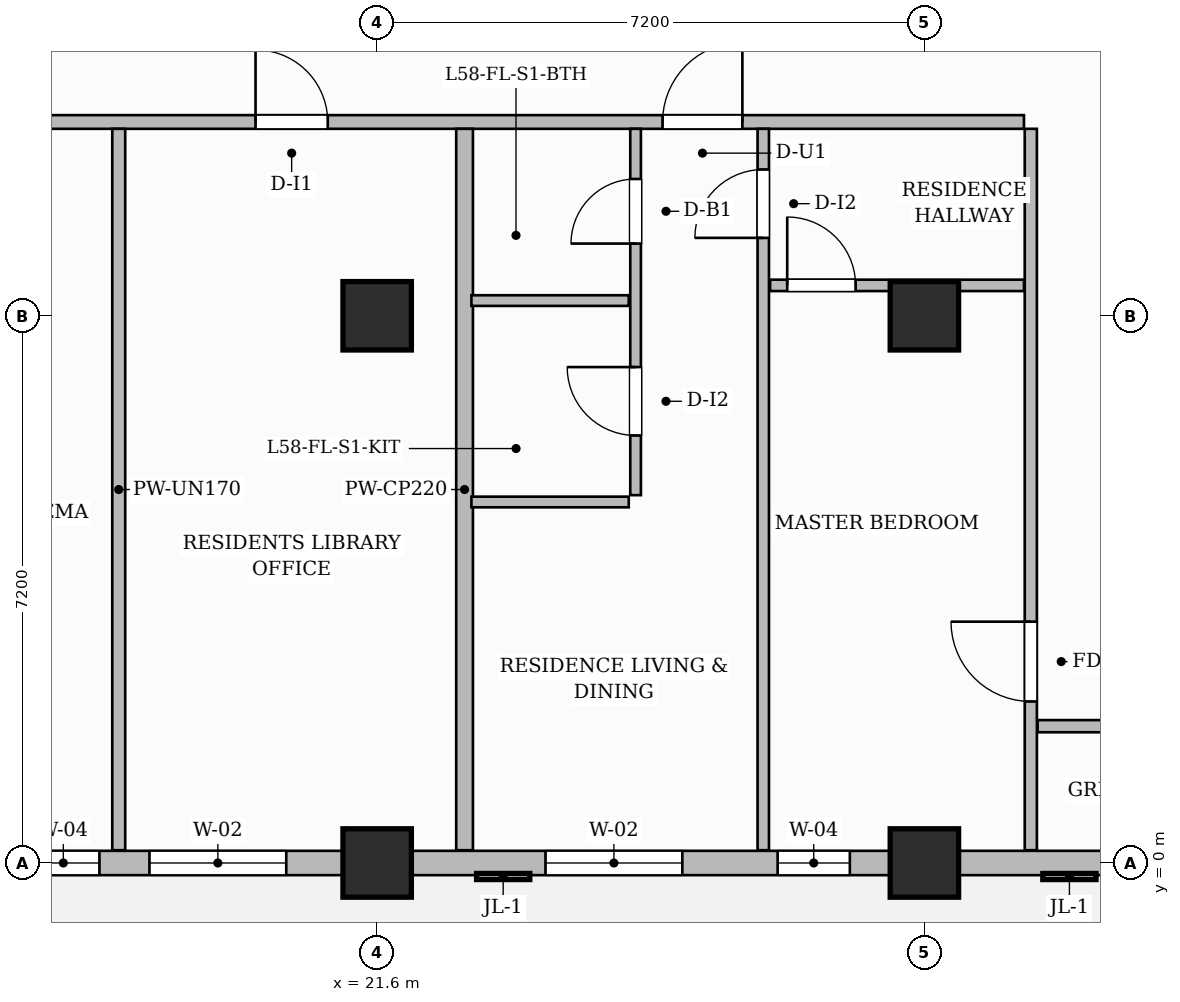
"""IFC4 building model, lengths in metres.
Left out: names, types, materials, properties, quantities, classifications, styles, units other than length and angle.
Written with IfcOpenShell. Run it as: python <this file> out.ifc"""

import sys

from ifc_helpers import new_model, si_unit, direction, frame, frame_2d, origin, origin_2d, place, context, subcontext, project, spatial, rectangle, extrude, source, transform, mapped, element, fill, save


model = new_model("IFC4")
c1 = context("Model", 3, precision=1e-05, world=origin(), true_north=direction((0.0, 1.0)))
c2 = subcontext(c1, "Body", "Model", "MODEL_VIEW")
j1 = project(units=[si_unit("LENGTHUNIT", "METRE"), si_unit("PLANEANGLEUNIT", "RADIAN")], contexts=[c1])
p1 = place(None, origin())
s1 = spatial("IfcSite", under=j1, at=p1, CompositionType="ELEMENT")
p2 = place(p1, origin())
s2 = spatial("IfcBuilding", under=s1, at=p2, CompositionType="ELEMENT")
p3 = place(p2, frame((0.0, 0.0, 232.7)))
s3 = spatial("IfcBuildingStorey", under=s2, at=p3, CompositionType="ELEMENT", Elevation=232.7)
m1 = source(origin(), c2, "Body", "SweptSolid", [
    extrude(rectangle(XDim=0.9, YDim=0.9, at=origin_2d()), origin(), (0.0, 0.0, 1.0), 3.85),
])
for number, where, z_axis, x_axis in (
    (1, (21.6, 0.0, 0.0), (0.0, 0.0, 1.0), (1.0, 0.0, 0.0)),
    (2, (21.6, 7.2, 0.0), (0.0, 0.0, 1.0), (1.0, 0.0, 0.0)),
    (3, (28.8, 0.0, 0.0), (0.0, 0.0, 1.0), (1.0, 0.0, 0.0)),
    (4, (28.8, 7.2, 0.0), (0.0, 0.0, 1.0), (1.0, 0.0, 0.0)),
):
    element("IfcColumn", number, at=place(p3, frame(where, z_axis=z_axis, x_axis=x_axis)), inside=s3, PredefinedType="COLUMN", context=c2, shape_type="MappedRepresentation", body=[
        mapped(m1, transform((0.0, 0.0, 0.0), scale=1.0)),
    ])
p4 = place(p3, frame((14.568, 9.75, 0.0), z_axis=(0.0, 0.0, 1.0), x_axis=(1.0, 0.0, 0.0)))
e5 = element("IfcWall", 5, at=p4, inside=s3, PredefinedType="PARTITIONING", context=c2, shape_type="SweptSolid", body=[
    extrude(rectangle(XDim=15.542, YDim=0.18, at=frame_2d((7.771, 0.0))), origin(), (0.0, 0.0, 1.0), 3.6),
])
p5 = place(p4, frame((1.032, 0.0, 0.0)))
e6 = element("IfcOpeningElement", 6, at=p5, cuts=e5, PredefinedType="OPENING", context=c2, shape_type="SweptSolid", body=[
    extrude(rectangle(XDim=1.4, YDim=2.35, at=frame_2d((0.7, 1.175))), frame((0.0, 0.1, 0.0), z_axis=(0.0, -1.0, 0.0), x_axis=(1.0, 0.0, 0.0)), (0.0, 0.0, 1.0), 0.2),
])
p6 = place(p4, frame((5.432, 0.0, 0.0)))
e7 = element("IfcOpeningElement", 7, at=p6, cuts=e5, PredefinedType="OPENING", context=c2, shape_type="SweptSolid", body=[
    extrude(rectangle(XDim=0.95, YDim=2.15, at=frame_2d((0.475, 1.075))), frame((0.0, 0.1, 0.0), z_axis=(0.0, -1.0, 0.0), x_axis=(1.0, 0.0, 0.0)), (0.0, 0.0, 1.0), 0.2),
])
p7 = place(p4, frame((10.787, 0.0, 0.0)))
e8 = element("IfcOpeningElement", 8, at=p7, cuts=e5, PredefinedType="OPENING", context=c2, shape_type="SweptSolid", body=[
    extrude(rectangle(XDim=1.05, YDim=2.25, at=frame_2d((0.525, 1.125))), frame((0.0, 0.1, 0.0), z_axis=(0.0, -1.0, 0.0), x_axis=(1.0, 0.0, 0.0)), (0.0, 0.0, 1.0), 0.2),
])
p8 = place(p3, frame((30.2, 0.168, 0.0), z_axis=(0.0, 0.0, 1.0), x_axis=(0.0, 1.0, 0.0)))
e9 = element("IfcWall", 9, at=p8, inside=s3, PredefinedType="PARTITIONING", context=c2, shape_type="SweptSolid", body=[
    extrude(rectangle(XDim=9.492, YDim=0.16, at=frame_2d((4.746, 0.0))), origin(), (0.0, 0.0, 1.0), 3.6),
])
p9 = place(p8, frame((1.957, 0.0, 0.0)))
e10 = element("IfcOpeningElement", 10, at=p9, cuts=e9, PredefinedType="OPENING", context=c2, shape_type="SweptSolid", body=[
    extrude(rectangle(XDim=1.05, YDim=2.15, at=frame_2d((0.525, 1.075))), frame((0.0, 0.09, 0.0), z_axis=(0.0, -1.0, 0.0), x_axis=(1.0, 0.0, 0.0)), (0.0, 0.0, 1.0), 0.18),
])
p10 = place(p3, frame((30.29, 1.8, 0.0), z_axis=(0.0, 0.0, 1.0), x_axis=(1.0, 0.0, 0.0)))
e11 = element("IfcWall", 11, at=p10, inside=s3, PredefinedType="PARTITIONING", context=c2, shape_type="SweptSolid", body=[
    extrude(rectangle(XDim=19.37, YDim=0.16, at=frame_2d((9.685, 0.0))), origin(), (0.0, 0.0, 1.0), 3.6),
])
p11 = place(p10, frame((5.074, 0.0, 0.0)))
e12 = element("IfcOpeningElement", 12, at=p11, cuts=e11, PredefinedType="OPENING", context=c2, shape_type="SweptSolid", body=[
    extrude(rectangle(XDim=0.9, YDim=2.15, at=frame_2d((0.45, 1.075))), frame((0.0, 0.09, 0.0), z_axis=(0.0, -1.0, 0.0), x_axis=(1.0, 0.0, 0.0)), (0.0, 0.0, 1.0), 0.18),
])
p12 = place(p10, frame((14.06, 0.0, 0.0)))
e13 = element("IfcOpeningElement", 13, at=p12, cuts=e11, PredefinedType="OPENING", context=c2, shape_type="SweptSolid", body=[
    extrude(rectangle(XDim=0.9, YDim=2.15, at=frame_2d((0.45, 1.075))), frame((0.0, 0.09, 0.0), z_axis=(0.0, -1.0, 0.0), x_axis=(1.0, 0.0, 0.0)), (0.0, 0.0, 1.0), 0.18),
])
p13 = place(p3, frame((18.2, 0.168, 0.0), z_axis=(0.0, 0.0, 1.0), x_axis=(0.0, 1.0, 0.0)))
e14 = element("IfcWall", 14, at=p13, inside=s3, PredefinedType="PARTITIONING", context=c2, shape_type="SweptSolid", body=[
    extrude(rectangle(XDim=9.492, YDim=0.17, at=frame_2d((4.746, 0.0))), origin(), (0.0, 0.0, 1.0), 3.315),
])
p14 = place(p3, frame((22.75, 0.168, 0.0), z_axis=(0.0, 0.0, 1.0), x_axis=(0.0, 1.0, 0.0)))
e15 = element("IfcWall", 15, at=p14, inside=s3, PredefinedType="PARTITIONING", context=c2, shape_type="SweptSolid", body=[
    extrude(rectangle(XDim=9.492, YDim=0.22, at=frame_2d((4.746, 0.0))), origin(), (0.0, 0.0, 1.0), 3.6),
])
p15 = place(p3, frame((25.0, 4.84, 0.0), z_axis=(0.0, 0.0, 1.0), x_axis=(0.0, 1.0, 0.0)))
e16 = element("IfcWall", 16, at=p15, inside=s3, PredefinedType="PARTITIONING", context=c2, shape_type="SweptSolid", body=[
    extrude(rectangle(XDim=4.82, YDim=0.14, at=frame_2d((2.41, 0.0))), origin(), (0.0, 0.0, 1.0), 3.315),
])
p16 = place(p15, frame((0.785, 0.0, 0.0)))
e17 = element("IfcOpeningElement", 17, at=p16, cuts=e16, PredefinedType="OPENING", context=c2, shape_type="SweptSolid", body=[
    extrude(rectangle(XDim=0.9, YDim=2.15, at=frame_2d((0.45, 1.075))), frame((0.0, 0.08, 0.0), z_axis=(0.0, -1.0, 0.0), x_axis=(1.0, 0.0, 0.0)), (0.0, 0.0, 1.0), 0.16),
])
p17 = place(p15, frame((3.31, 0.0, 0.0)))
e18 = element("IfcOpeningElement", 18, at=p17, cuts=e16, PredefinedType="OPENING", context=c2, shape_type="SweptSolid", body=[
    extrude(rectangle(XDim=0.85, YDim=2.1, at=frame_2d((0.425, 1.05))), frame((0.0, 0.08, 0.0), z_axis=(0.0, -1.0, 0.0), x_axis=(1.0, 0.0, 0.0)), (0.0, 0.0, 1.0), 0.16),
])
p18 = place(p3, frame((22.84, 7.4, 0.0), z_axis=(0.0, 0.0, 1.0), x_axis=(1.0, 0.0, 0.0)))
e19 = element("IfcWall", 19, at=p18, inside=s3, PredefinedType="PARTITIONING", context=c2, shape_type="SweptSolid", body=[
    extrude(rectangle(XDim=2.07, YDim=0.14, at=frame_2d((1.035, 0.0))), origin(), (0.0, 0.0, 1.0), 3.135),
])
p19 = place(p3, frame((22.84, 4.75, 0.0), z_axis=(0.0, 0.0, 1.0), x_axis=(1.0, 0.0, 0.0)))
e20 = element("IfcWall", 20, at=p19, inside=s3, PredefinedType="PARTITIONING", context=c2, shape_type="SweptSolid", body=[
    extrude(rectangle(XDim=2.07, YDim=0.14, at=frame_2d((1.035, 0.0))), origin(), (0.0, 0.0, 1.0), 3.6),
])
p20 = place(p3, frame((26.68, 0.168, 0.0), z_axis=(0.0, 0.0, 1.0), x_axis=(0.0, 1.0, 0.0)))
e21 = element("IfcWall", 21, at=p20, inside=s3, PredefinedType="PARTITIONING", context=c2, shape_type="SweptSolid", body=[
    extrude(rectangle(XDim=9.492, YDim=0.15, at=frame_2d((4.746, 0.0))), origin(), (0.0, 0.0, 1.0), 3.6),
])
p21 = place(p20, frame((8.057, 0.0, 0.0)))
e22 = element("IfcOpeningElement", 22, at=p21, cuts=e21, PredefinedType="OPENING", context=c2, shape_type="SweptSolid", body=[
    extrude(rectangle(XDim=0.9, YDim=2.15, at=frame_2d((0.45, 1.075))), frame((0.0, 0.085, 0.0), z_axis=(0.0, -1.0, 0.0), x_axis=(1.0, 0.0, 0.0)), (0.0, 0.0, 1.0), 0.17),
])
p22 = place(p3, frame((26.77, 7.6, 0.0), z_axis=(0.0, 0.0, 1.0), x_axis=(1.0, 0.0, 0.0)))
e23 = element("IfcWall", 23, at=p22, inside=s3, PredefinedType="PARTITIONING", context=c2, shape_type="SweptSolid", body=[
    extrude(rectangle(XDim=3.34, YDim=0.15, at=frame_2d((1.67, 0.0))), origin(), (0.0, 0.0, 1.0), 3.6),
])
p23 = place(p22, frame((0.225, 0.0, 0.0)))
e24 = element("IfcOpeningElement", 24, at=p23, cuts=e23, PredefinedType="OPENING", context=c2, shape_type="SweptSolid", body=[
    extrude(rectangle(XDim=0.9, YDim=2.15, at=frame_2d((0.45, 1.075))), frame((0.0, 0.085, 0.0), z_axis=(0.0, -1.0, 0.0), x_axis=(1.0, 0.0, 0.0)), (0.0, 0.0, 1.0), 0.17),
])
p24 = place(p3, frame((14.4, 0.0, 0.0), z_axis=(0.0, 0.0, 1.0), x_axis=(1.0, 0.0, 0.0)))
e25 = element("IfcWall", 25, at=p24, inside=s3, PredefinedType="SOLIDWALL", context=c2, shape_type="SweptSolid", body=[
    extrude(rectangle(XDim=35.4, YDim=0.32, at=frame_2d((17.7, 0.0))), origin(), (0.0, 0.0, 1.0), 3.135),
])
p25 = place(p24, frame((0.85, 0.0, 0.0)))
e26 = element("IfcOpeningElement", 26, at=p25, cuts=e25, PredefinedType="OPENING", context=c2, shape_type="SweptSolid", body=[
    extrude(rectangle(XDim=1.2, YDim=2.2, at=frame_2d((0.6, 1.1))), frame((0.0, 0.17, 0.0), z_axis=(0.0, -1.0, 0.0), x_axis=(1.0, 0.0, 0.0)), (0.0, 0.0, 1.0), 0.34),
])
p26 = place(p24, frame((2.596, 0.0, 0.8)))
e27 = element("IfcOpeningElement", 27, at=p26, cuts=e25, PredefinedType="OPENING", context=c2, shape_type="SweptSolid", body=[
    extrude(rectangle(XDim=0.95, YDim=1.75, at=frame_2d((0.475, 0.875))), frame((0.0, 0.17, 0.0), z_axis=(0.0, -1.0, 0.0), x_axis=(1.0, 0.0, 0.0)), (0.0, 0.0, 1.0), 0.34),
])
p27 = place(p24, frame((4.204, 0.0, 0.8)))
e28 = element("IfcOpeningElement", 28, at=p27, cuts=e25, PredefinedType="OPENING", context=c2, shape_type="SweptSolid", body=[
    extrude(rectangle(XDim=1.8, YDim=1.85, at=frame_2d((0.9, 0.925))), frame((0.0, 0.17, 0.0), z_axis=(0.0, -1.0, 0.0), x_axis=(1.0, 0.0, 0.0)), (0.0, 0.0, 1.0), 0.34),
])
p28 = place(p24, frame((9.415, 0.0, 0.8)))
e29 = element("IfcOpeningElement", 29, at=p28, cuts=e25, PredefinedType="OPENING", context=c2, shape_type="SweptSolid", body=[
    extrude(rectangle(XDim=1.8, YDim=1.85, at=frame_2d((0.9, 0.925))), frame((0.0, 0.17, 0.0), z_axis=(0.0, -1.0, 0.0), x_axis=(1.0, 0.0, 0.0)), (0.0, 0.0, 1.0), 0.34),
])
p29 = place(p24, frame((12.469, 0.0, 0.8)))
e30 = element("IfcOpeningElement", 30, at=p29, cuts=e25, PredefinedType="OPENING", context=c2, shape_type="SweptSolid", body=[
    extrude(rectangle(XDim=0.95, YDim=1.75, at=frame_2d((0.475, 0.875))), frame((0.0, 0.17, 0.0), z_axis=(0.0, -1.0, 0.0), x_axis=(1.0, 0.0, 0.0)), (0.0, 0.0, 1.0), 0.34),
])
p30 = place(p24, frame((16.804, 0.0, 0.8)))
e31 = element("IfcOpeningElement", 31, at=p30, cuts=e25, PredefinedType="OPENING", context=c2, shape_type="SweptSolid", body=[
    extrude(rectangle(XDim=1.8, YDim=1.85, at=frame_2d((0.9, 0.925))), frame((0.0, 0.17, 0.0), z_axis=(0.0, -1.0, 0.0), x_axis=(1.0, 0.0, 0.0)), (0.0, 0.0, 1.0), 0.34),
])
p31 = place(p24, frame((22.396, 0.0, 0.8)))
e32 = element("IfcOpeningElement", 32, at=p31, cuts=e25, PredefinedType="OPENING", context=c2, shape_type="SweptSolid", body=[
    extrude(rectangle(XDim=1.8, YDim=1.85, at=frame_2d((0.9, 0.925))), frame((0.0, 0.17, 0.0), z_axis=(0.0, -1.0, 0.0), x_axis=(1.0, 0.0, 0.0)), (0.0, 0.0, 1.0), 0.34),
])
p32 = place(p24, frame((25.629, 0.0, 0.8)))
e33 = element("IfcOpeningElement", 33, at=p32, cuts=e25, PredefinedType="OPENING", context=c2, shape_type="SweptSolid", body=[
    extrude(rectangle(XDim=0.95, YDim=1.75, at=frame_2d((0.475, 0.875))), frame((0.0, 0.17, 0.0), z_axis=(0.0, -1.0, 0.0), x_axis=(1.0, 0.0, 0.0)), (0.0, 0.0, 1.0), 0.34),
])
p33 = place(p24, frame((29.075, 0.0, 0.8)))
e34 = element("IfcOpeningElement", 34, at=p33, cuts=e25, PredefinedType="OPENING", context=c2, shape_type="SweptSolid", body=[
    extrude(rectangle(XDim=1.8, YDim=1.85, at=frame_2d((0.9, 0.925))), frame((0.0, 0.17, 0.0), z_axis=(0.0, -1.0, 0.0), x_axis=(1.0, 0.0, 0.0)), (0.0, 0.0, 1.0), 0.34),
])
p34 = place(p24, frame((32.125, 0.0, 0.8)))
e35 = element("IfcOpeningElement", 35, at=p34, cuts=e25, PredefinedType="OPENING", context=c2, shape_type="SweptSolid", body=[
    extrude(rectangle(XDim=1.8, YDim=1.85, at=frame_2d((0.9, 0.925))), frame((0.0, 0.17, 0.0), z_axis=(0.0, -1.0, 0.0), x_axis=(1.0, 0.0, 0.0)), (0.0, 0.0, 1.0), 0.34),
])
m2 = source(origin(), c2, "Body", "SweptSolid", [
    extrude(rectangle(XDim=1.05, YDim=2.15, at=frame_2d((0.525, 1.075))), frame((0.0, 0.025, 0.0), z_axis=(0.0, -1.0, 0.0), x_axis=(1.0, 0.0, 0.0)), (0.0, 0.0, 1.0), 0.05),
])
p35 = place(p9, origin())
e36 = element("IfcDoor", 36, at=p35, inside=s3, OperationType="SINGLE_SWING_RIGHT", PredefinedType="DOOR", context=c2, shape_type="MappedRepresentation", body=[
    mapped(m2, transform((0.0, 0.0, 0.0), scale=1.0)),
])
fill(e10, e36)
m3 = source(origin(), c2, "Body", "SweptSolid", [
    extrude(rectangle(XDim=0.95, YDim=2.15, at=frame_2d((0.475, 1.075))), frame((0.0, 0.025, 0.0), z_axis=(0.0, -1.0, 0.0), x_axis=(1.0, 0.0, 0.0)), (0.0, 0.0, 1.0), 0.05),
])
p36 = place(p6, origin())
e37 = element("IfcDoor", 37, at=p36, inside=s3, OperationType="SINGLE_SWING_LEFT", PredefinedType="DOOR", context=c2, shape_type="MappedRepresentation", body=[
    mapped(m3, transform((0.0, 0.0, 0.0), scale=1.0)),
])
fill(e7, e37)
m4 = source(origin(), c2, "Body", "SweptSolid", [
    extrude(rectangle(XDim=0.9, YDim=2.15, at=frame_2d((0.45, 1.075))), frame((0.0, 0.025, 0.0), z_axis=(0.0, -1.0, 0.0), x_axis=(1.0, 0.0, 0.0)), (0.0, 0.0, 1.0), 0.05),
])
p37 = place(p16, origin())
e38 = element("IfcDoor", 38, at=p37, inside=s3, OperationType="SINGLE_SWING_RIGHT", PredefinedType="DOOR", context=c2, shape_type="MappedRepresentation", body=[
    mapped(m4, transform((0.0, 0.0, 0.0), scale=1.0)),
])
fill(e17, e38)
m5 = source(origin(), c2, "Body", "SweptSolid", [
    extrude(rectangle(XDim=0.85, YDim=2.1, at=frame_2d((0.425, 1.05))), frame((0.0, 0.025, 0.0), z_axis=(0.0, -1.0, 0.0), x_axis=(1.0, 0.0, 0.0)), (0.0, 0.0, 1.0), 0.05),
])
p38 = place(p17, origin())
e39 = element("IfcDoor", 39, at=p38, inside=s3, OperationType="SINGLE_SWING_LEFT", PredefinedType="DOOR", context=c2, shape_type="MappedRepresentation", body=[
    mapped(m5, transform((0.0, 0.0, 0.0), scale=1.0)),
])
fill(e18, e39)
m6 = source(origin(), c2, "Body", "SweptSolid", [
    extrude(rectangle(XDim=1.05, YDim=2.25, at=frame_2d((0.525, 1.125))), frame((0.0, 0.025, 0.0), z_axis=(0.0, -1.0, 0.0), x_axis=(1.0, 0.0, 0.0)), (0.0, 0.0, 1.0), 0.05),
])
p39 = place(p7, origin())
e40 = element("IfcDoor", 40, at=p39, inside=s3, OperationType="SINGLE_SWING_RIGHT", PredefinedType="DOOR", context=c2, shape_type="MappedRepresentation", body=[
    mapped(m6, transform((0.0, 0.0, 0.0), scale=1.0)),
])
fill(e8, e40)
p40 = place(p21, origin())
e41 = element("IfcDoor", 41, at=p40, inside=s3, OperationType="SINGLE_SWING_LEFT", PredefinedType="DOOR", context=c2, shape_type="MappedRepresentation", body=[
    mapped(m4, transform((0.0, 0.0, 0.0), scale=1.0)),
])
fill(e22, e41)
p41 = place(p23, origin())
e42 = element("IfcDoor", 42, at=p41, inside=s3, OperationType="SINGLE_SWING_LEFT", PredefinedType="DOOR", context=c2, shape_type="MappedRepresentation", body=[
    mapped(m4, transform((0.0, 0.0, 0.0), scale=1.0)),
])
fill(e24, e42)
m7 = source(origin(), c2, "Body", "SweptSolid", [
    extrude(rectangle(XDim=0.95, YDim=1.75, at=frame_2d((0.475, 0.875))), frame((0.0, 0.03, 0.0), z_axis=(0.0, -1.0, 0.0), x_axis=(1.0, 0.0, 0.0)), (0.0, 0.0, 1.0), 0.06),
])
p42 = place(p26, origin())
e43 = element("IfcWindow", 43, at=p42, inside=s3, PartitioningType="SINGLE_PANEL", PredefinedType="WINDOW", context=c2, shape_type="MappedRepresentation", body=[
    mapped(m7, transform((0.0, 0.0, 0.0), scale=1.0)),
])
fill(e27, e43)
m8 = source(origin(), c2, "Body", "SweptSolid", [
    extrude(rectangle(XDim=1.8, YDim=1.85, at=frame_2d((0.9, 0.925))), frame((0.0, 0.03, 0.0), z_axis=(0.0, -1.0, 0.0), x_axis=(1.0, 0.0, 0.0)), (0.0, 0.0, 1.0), 0.06),
])
p43 = place(p27, origin())
e44 = element("IfcWindow", 44, at=p43, inside=s3, PartitioningType="DOUBLE_PANEL_VERTICAL", PredefinedType="WINDOW", context=c2, shape_type="MappedRepresentation", body=[
    mapped(m8, transform((0.0, 0.0, 0.0), scale=1.0)),
])
fill(e28, e44)
p44 = place(p28, origin())
e45 = element("IfcWindow", 45, at=p44, inside=s3, PartitioningType="DOUBLE_PANEL_VERTICAL", PredefinedType="WINDOW", context=c2, shape_type="MappedRepresentation", body=[
    mapped(m8, transform((0.0, 0.0, 0.0), scale=1.0)),
])
fill(e29, e45)
p45 = place(p29, origin())
e46 = element("IfcWindow", 46, at=p45, inside=s3, PartitioningType="SINGLE_PANEL", PredefinedType="WINDOW", context=c2, shape_type="MappedRepresentation", body=[
    mapped(m7, transform((0.0, 0.0, 0.0), scale=1.0)),
])
fill(e30, e46)
save(model, sys.argv[1])
